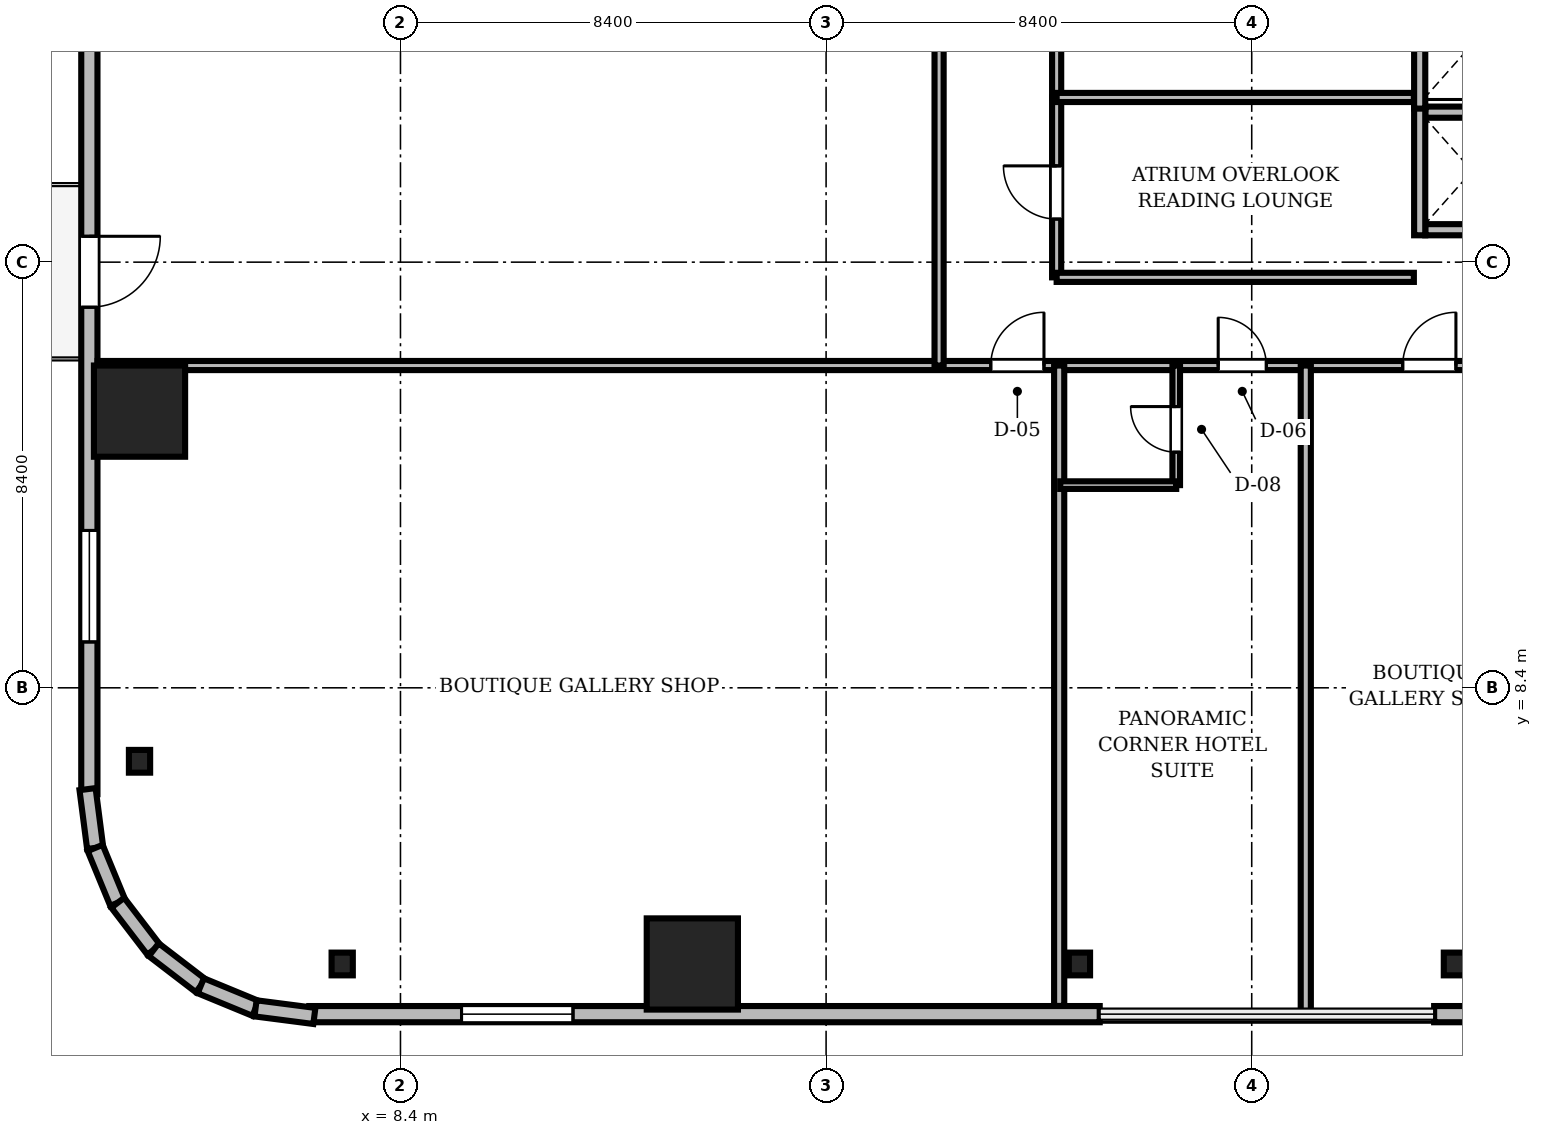
"""IFC4 building model, lengths in metres.
Left out: names, types, materials, properties, quantities, classifications, styles, units other than length and angle.
Written with IfcOpenShell. Run it as: python <this file> out.ifc"""

import sys

from ifc_helpers import new_model, si_unit, direction, frame, frame_2d, origin, origin_2d, place, context, subcontext, project, spatial, rectangle, i_section, extrude, source, transform, mapped, element, fill, save


model = new_model("IFC4")
c1 = context("Model", 3, precision=1e-05, world=origin(), true_north=direction((0.0, 1.0)))
c2 = subcontext(c1, "Body", "Model", "MODEL_VIEW")
j1 = project(units=[si_unit("LENGTHUNIT", "METRE"), si_unit("PLANEANGLEUNIT", "RADIAN")], contexts=[c1])
p1 = place(None, origin())
s1 = spatial("IfcSite", under=j1, at=p1, CompositionType="ELEMENT")
p2 = place(p1, origin())
s2 = spatial("IfcBuilding", under=s1, at=p2, CompositionType="ELEMENT")
p3 = place(p2, frame((0.0, 0.0, 45.85)))
s3 = spatial("IfcBuildingStorey", under=s2, at=p3, CompositionType="ELEMENT", Elevation=45.85)
m1 = source(origin(), c2, "Body", "SweptSolid", [
    extrude(rectangle(XDim=1.8, YDim=1.8, at=origin_2d()), origin(), (0.0, 0.0, 1.0), 3.41),
])
for number, where, z_axis, x_axis in (
    (1, (14.16, 2.95, 0.0), (0.0, 0.0, 1.0), (1.0, 0.0, 0.0)),
    (2, (3.25, 13.86, 0.0), (0.0, 0.0, 1.0), (1.0, 0.0, 0.0)),
):
    element("IfcColumn", number, at=place(p3, frame(where, z_axis=z_axis, x_axis=x_axis)), inside=s3, PredefinedType="COLUMN", context=c2, shape_type="MappedRepresentation", body=[
        mapped(m1, transform((0.0, 0.0, 0.0), scale=1.0)),
    ])
m2 = source(origin(), c2, "Body", "SweptSolid", [
    extrude(i_section(OverallWidth=0.419, OverallDepth=0.449, WebThickness=0.031, FlangeThickness=0.048, FilletRadius=0.015, at=origin_2d()), origin(), (0.0, 0.0, 1.0), 3.41),
])
for number, where, z_axis, x_axis in (
    (3, (7.25, 2.95, 0.0), (0.0, 0.0, 1.0), (1.0, 0.0, 0.0)),
    (4, (21.8, 2.95, 0.0), (0.0, 0.0, 1.0), (1.0, 0.0, 0.0)),
    (5, (29.2, 2.95, 0.0), (0.0, 0.0, 1.0), (1.0, 0.0, 0.0)),
    (6, (3.25, 6.95, 0.0), (0.0, 0.0, 1.0), (1.0, 0.0, 0.0)),
):
    element("IfcColumn", number, at=place(p3, frame(where, z_axis=z_axis, x_axis=x_axis)), inside=s3, PredefinedType="COLUMN", context=c2, shape_type="MappedRepresentation", body=[
        mapped(m2, transform((0.0, 0.0, 0.0), scale=1.0)),
    ])
m3 = source(origin(), c2, "Body", "SweptSolid", [
    extrude(rectangle(XDim=15.6, YDim=0.32, at=frame_2d((7.8, 0.0))), origin(), (0.0, 0.0, 1.0), 3.41),
])
p4 = place(p3, frame((6.6, 1.96, 0.0), z_axis=(0.0, 0.0, 1.0), x_axis=(1.0, 0.0, 0.0)))
e7 = element("IfcWall", 7, at=p4, inside=s3, PredefinedType="SOLIDWALL", context=c2, shape_type="MappedRepresentation", body=[
    mapped(m3, transform((0.0, 0.0, 0.0), scale=1.0)),
])
m4 = source(origin(), c2, "Body", "SweptSolid", [
    extrude(rectangle(XDim=2.2, YDim=2.4, at=frame_2d((1.1, 1.2))), frame((0.0, 0.17, 0.0), z_axis=(0.0, -1.0, 0.0), x_axis=(1.0, 0.0, 0.0)), (0.0, 0.0, 1.0), 0.34),
])
p5 = place(p4, frame((3.005, 0.0, 0.72)))
e8 = element("IfcOpeningElement", 8, at=p5, cuts=e7, PredefinedType="OPENING", context=c2, shape_type="MappedRepresentation", body=[
    mapped(m4, transform((0.0, 0.0, 0.0), scale=1.0)),
])
p6 = place(p3, frame((28.8, 1.96, 0.0), z_axis=(0.0, 0.0, 1.0), x_axis=(1.0, 0.0, 0.0)))
e9 = element("IfcWall", 9, at=p6, inside=s3, PredefinedType="SOLIDWALL", context=c2, shape_type="MappedRepresentation", body=[
    mapped(m3, transform((0.0, 0.0, 0.0), scale=1.0)),
])
m5 = source(origin(), c2, "Body", "SweptSolid", [
    extrude(rectangle(XDim=1.4, YDim=2.3, at=frame_2d((0.7, 1.15))), frame((0.0, 0.17, 0.0), z_axis=(0.0, -1.0, 0.0), x_axis=(1.0, 0.0, 0.0)), (0.0, 0.0, 1.0), 0.34),
])
p7 = place(p6, frame((4.59, 0.0, 0.0)))
e10 = element("IfcOpeningElement", 10, at=p7, cuts=e9, PredefinedType="OPENING", context=c2, shape_type="MappedRepresentation", body=[
    mapped(m5, transform((0.0, 0.0, 0.0), scale=1.0)),
])
p8 = place(p6, frame((9.495, 0.0, 0.72)))
e11 = element("IfcOpeningElement", 11, at=p8, cuts=e9, PredefinedType="OPENING", context=c2, shape_type="MappedRepresentation", body=[
    mapped(m4, transform((0.0, 0.0, 0.0), scale=1.0)),
])
p9 = place(p3, frame((2.26, 21.9, 0.0), z_axis=(0.0, 0.0, 1.0), x_axis=(0.0, -1.0, 0.0)))
e12 = element("IfcWall", 12, at=p9, inside=s3, PredefinedType="SOLIDWALL", context=c2, shape_type="MappedRepresentation", body=[
    mapped(m3, transform((0.0, 0.0, 0.0), scale=1.0)),
])
p10 = place(p9, frame((4.59, 0.0, 0.0)))
e13 = element("IfcOpeningElement", 13, at=p10, cuts=e12, PredefinedType="OPENING", context=c2, shape_type="MappedRepresentation", body=[
    mapped(m5, transform((0.0, 0.0, 0.0), scale=1.0)),
])
p11 = place(p9, frame((10.395, 0.0, 0.72)))
e14 = element("IfcOpeningElement", 14, at=p11, cuts=e12, PredefinedType="OPENING", context=c2, shape_type="MappedRepresentation", body=[
    mapped(m4, transform((0.0, 0.0, 0.0), scale=1.0)),
])
m6 = source(origin(), c2, "Body", "SweptSolid", [
    extrude(rectangle(XDim=1.171, YDim=0.32, at=frame_2d((0.585, 0.0))), origin(), (0.0, 0.0, 1.0), 3.41),
])
p12 = place(p3, frame((2.224, 6.401, 0.0), z_axis=(0.0, 0.0, 1.0), x_axis=(0.128269133229, -0.991739395941, 0.0)))
e15 = element("IfcWall", 15, at=p12, inside=s3, PredefinedType="SOLIDWALL", context=c2, shape_type="MappedRepresentation", body=[
    mapped(m6, transform((0.0, 0.0, 0.0), scale=1.0)),
])
m7 = source(origin(), c2, "Body", "SweptSolid", [
    extrude(rectangle(XDim=1.169, YDim=0.32, at=frame_2d((0.584, 0.0))), origin(), (0.0, 0.0, 1.0), 3.41),
])
for number, where, z_axis, x_axis in (
    (16, (2.375, 5.24, 0.0), (0.0, 0.0, 1.0), (0.381, -0.925, 0.0)),
    (17, (2.82, 4.159, 0.0), (0.0, 0.0, 1.0), (0.608, -0.794, 0.0)),
):
    element("IfcWall", number, at=place(p3, frame(where, z_axis=z_axis, x_axis=x_axis)), inside=s3, PredefinedType="SOLIDWALL", context=c2, shape_type="MappedRepresentation", body=[
        mapped(m7, transform((0.0, 0.0, 0.0), scale=1.0)),
    ])
m8 = source(origin(), c2, "Body", "SweptSolid", [
    extrude(rectangle(XDim=1.169, YDim=0.32, at=frame_2d((0.584, 0.0))), origin(), (0.0, 0.0, 1.0), 3.41),
])
p13 = place(p3, frame((3.531, 3.231, 0.0), z_axis=(0.0, 0.0, 1.0), x_axis=(0.793663520347, -0.608356981114, 0.0)))
e18 = element("IfcWall", 18, at=p13, inside=s3, PredefinedType="SOLIDWALL", context=c2, shape_type="MappedRepresentation", body=[
    mapped(m8, transform((0.0, 0.0, 0.0), scale=1.0)),
])
m9 = source(origin(), c2, "Body", "SweptSolid", [
    extrude(rectangle(XDim=1.169, YDim=0.32, at=frame_2d((0.585, 0.0))), origin(), (0.0, 0.0, 1.0), 3.41),
])
p14 = place(p3, frame((4.459, 2.52, 0.0), z_axis=(0.0, 0.0, 1.0), x_axis=(0.924479075121, -0.381232789334, 0.0)))
e19 = element("IfcWall", 19, at=p14, inside=s3, PredefinedType="SOLIDWALL", context=c2, shape_type="MappedRepresentation", body=[
    mapped(m9, transform((0.0, 0.0, 0.0), scale=1.0)),
])
m10 = source(origin(), c2, "Body", "SweptSolid", [
    extrude(rectangle(XDim=1.17, YDim=0.32, at=frame_2d((0.585, 0.0))), origin(), (0.0, 0.0, 1.0), 3.41),
])
p15 = place(p3, frame((5.54, 2.074, 0.0), z_axis=(0.0, 0.0, 1.0), x_axis=(0.991762485493, -0.128090485085, 0.0)))
e20 = element("IfcWall", 20, at=p15, inside=s3, PredefinedType="SOLIDWALL", context=c2, shape_type="MappedRepresentation", body=[
    mapped(m10, transform((0.0, 0.0, 0.0), scale=1.0)),
])
m11 = source(origin(), c2, "Body", "SweptSolid", [
    extrude(rectangle(XDim=1.85, YDim=0.22, at=frame_2d((0.925, 0.0))), origin(), (0.0, 0.0, 1.0), 3.41),
])
for number, where, z_axis, x_axis in (
    (21, (28.625, 17.44, 0.0), (0.0, 0.0, 1.0), (1.0, 0.0, 0.0)),
    (22, (28.625, 19.76, 0.0), (0.0, 0.0, 1.0), (1.0, 0.0, 0.0)),
):
    element("IfcWall", number, at=place(p3, frame(where, z_axis=z_axis, x_axis=x_axis)), inside=s3, PredefinedType="SOLIDWALL", context=c2, shape_type="MappedRepresentation", body=[
        mapped(m11, transform((0.0, 0.0, 0.0), scale=1.0)),
    ])
m12 = source(origin(), c2, "Body", "SweptSolid", [
    extrude(rectangle(XDim=2.54, YDim=0.22, at=frame_2d((1.27, 0.0))), origin(), (0.0, 0.0, 1.0), 3.41),
])
for number, where, z_axis, x_axis in (
    (23, (28.515, 17.33, 0.0), (0.0, 0.0, 1.0), (0.0, 1.0, 0.0)),
    (24, (28.515, 19.83, 0.0), (0.0, 0.0, 1.0), (0.0, 1.0, 0.0)),
):
    element("IfcWall", number, at=place(p3, frame(where, z_axis=z_axis, x_axis=x_axis)), inside=s3, PredefinedType="SOLIDWALL", context=c2, shape_type="MappedRepresentation", body=[
        mapped(m12, transform((0.0, 0.0, 0.0), scale=1.0)),
    ])
m13 = source(origin(), c2, "Body", "SweptSolid", [
    extrude(rectangle(XDim=46.156, YDim=0.18, at=frame_2d((23.078, 0.0))), origin(), (0.0, 0.0, 1.0), 2.652),
])
p16 = place(p3, frame((2.422, 14.76, 0.0), z_axis=(0.0, 0.0, 1.0), x_axis=(1.0, 0.0, 0.0)))
e25 = element("IfcWall", 25, at=p16, inside=s3, PredefinedType="PARTITIONING", context=c2, shape_type="MappedRepresentation", body=[
    mapped(m13, transform((0.0, 0.0, 0.0), scale=1.0)),
])
m14 = source(origin(), c2, "Body", "SweptSolid", [
    extrude(rectangle(XDim=1.05, YDim=2.2, at=frame_2d((0.525, 1.1))), frame((0.0, 0.1, 0.0), z_axis=(0.0, -1.0, 0.0), x_axis=(1.0, 0.0, 0.0)), (0.0, 0.0, 1.0), 0.2),
])
p17 = place(p16, frame((17.628, 0.0, 0.0)))
e26 = element("IfcOpeningElement", 26, at=p17, cuts=e25, PredefinedType="OPENING", context=c2, shape_type="MappedRepresentation", body=[
    mapped(m14, transform((0.0, 0.0, 0.0), scale=1.0)),
])
m15 = source(origin(), c2, "Body", "SweptSolid", [
    extrude(rectangle(XDim=0.95, YDim=2.15, at=frame_2d((0.475, 1.075))), frame((0.0, 0.1, 0.0), z_axis=(0.0, -1.0, 0.0), x_axis=(1.0, 0.0, 0.0)), (0.0, 0.0, 1.0), 0.2),
])
p18 = place(p16, frame((22.116, 0.0, 0.0)))
e27 = element("IfcOpeningElement", 27, at=p18, cuts=e25, PredefinedType="OPENING", context=c2, shape_type="MappedRepresentation", body=[
    mapped(m15, transform((0.0, 0.0, 0.0), scale=1.0)),
])
p19 = place(p16, frame((25.758, 0.0, 0.0)))
e28 = element("IfcOpeningElement", 28, at=p19, cuts=e25, PredefinedType="OPENING", context=c2, shape_type="MappedRepresentation", body=[
    mapped(m14, transform((0.0, 0.0, 0.0), scale=1.0)),
])
p20 = place(p16, frame((30.625, 0.0, 0.0)))
e29 = element("IfcOpeningElement", 29, at=p20, cuts=e25, PredefinedType="OPENING", context=c2, shape_type="MappedRepresentation", body=[
    mapped(m14, transform((0.0, 0.0, 0.0), scale=1.0)),
])
p21 = place(p16, frame((36.716, 0.0, 0.0)))
e30 = element("IfcOpeningElement", 30, at=p21, cuts=e25, PredefinedType="OPENING", context=c2, shape_type="MappedRepresentation", body=[
    mapped(m15, transform((0.0, 0.0, 0.0), scale=1.0)),
])
p22 = place(p16, frame((41.766, 0.0, 0.0)))
e31 = element("IfcOpeningElement", 31, at=p22, cuts=e25, PredefinedType="OPENING", context=c2, shape_type="MappedRepresentation", body=[
    mapped(m14, transform((0.0, 0.0, 0.0), scale=1.0)),
])
m16 = source(origin(), c2, "Body", "SweptSolid", [
    extrude(rectangle(XDim=4.15, YDim=0.18, at=frame_2d((2.075, 0.0))), origin(), (0.0, 0.0, 1.0), 3.042),
])
p23 = place(p3, frame((21.35, 20.05, 0.0), z_axis=(0.0, 0.0, 1.0), x_axis=(0.0, 1.0, 0.0)))
e32 = element("IfcWall", 32, at=p23, inside=s3, PredefinedType="PARTITIONING", context=c2, shape_type="MappedRepresentation", body=[
    mapped(m16, transform((0.0, 0.0, 0.0), scale=1.0)),
])
p24 = place(p23, frame((1.4, 0.0, 0.0)))
e33 = element("IfcOpeningElement", 33, at=p24, cuts=e32, PredefinedType="OPENING", context=c2, shape_type="MappedRepresentation", body=[
    mapped(m14, transform((0.0, 0.0, 0.0), scale=1.0)),
])
m17 = source(origin(), c2, "Body", "SweptSolid", [
    extrude(rectangle(XDim=3.55, YDim=0.18, at=frame_2d((1.775, 0.0))), origin(), (0.0, 0.0, 1.0), 2.802),
])
p25 = place(p3, frame((21.35, 16.5, 0.0), z_axis=(0.0, 0.0, 1.0), x_axis=(0.0, 1.0, 0.0)))
e34 = element("IfcWall", 34, at=p25, inside=s3, PredefinedType="PARTITIONING", context=c2, shape_type="MappedRepresentation", body=[
    mapped(m17, transform((0.0, 0.0, 0.0), scale=1.0)),
])
p26 = place(p25, frame((1.15, 0.0, 0.0)))
e35 = element("IfcOpeningElement", 35, at=p26, cuts=e34, PredefinedType="OPENING", context=c2, shape_type="MappedRepresentation", body=[
    mapped(m14, transform((0.0, 0.0, 0.0), scale=1.0)),
])
m18 = source(origin(), c2, "Body", "SweptSolid", [
    extrude(rectangle(XDim=2.36, YDim=0.15, at=frame_2d((1.18, 0.0))), origin(), (0.0, 0.0, 1.0), 3.41),
])
p27 = place(p3, frame((23.71, 12.4, 0.0), z_axis=(0.0, 0.0, 1.0), x_axis=(0.0, 1.0, 0.0)))
e36 = element("IfcWall", 36, at=p27, inside=s3, PredefinedType="PARTITIONING", context=c2, shape_type="MappedRepresentation", body=[
    mapped(m18, transform((0.0, 0.0, 0.0), scale=1.0)),
])
m19 = source(origin(), c2, "Body", "SweptSolid", [
    extrude(rectangle(XDim=0.9, YDim=2.1, at=frame_2d((0.45, 1.05))), frame((0.0, 0.085, 0.0), z_axis=(0.0, -1.0, 0.0), x_axis=(1.0, 0.0, 0.0)), (0.0, 0.0, 1.0), 0.17),
])
p28 = place(p27, frame((0.65, 0.0, 0.0)))
e37 = element("IfcOpeningElement", 37, at=p28, cuts=e36, PredefinedType="OPENING", context=c2, shape_type="MappedRepresentation", body=[
    mapped(m19, transform((0.0, 0.0, 0.0), scale=1.0)),
])
m20 = source(origin(), c2, "Body", "SweptSolid", [
    extrude(rectangle(XDim=13.79, YDim=0.18, at=frame_2d((6.895, 0.0))), origin(), (0.0, 0.0, 1.0), 2.802),
])
p29 = place(p3, frame((19.03, 14.76, 0.0), z_axis=(0.0, 0.0, 1.0), x_axis=(0.0, 1.0, 0.0)))
e38 = element("IfcWall", 38, at=p29, inside=s3, PredefinedType="PARTITIONING", context=c2, shape_type="MappedRepresentation", body=[
    mapped(m20, transform((0.0, 0.0, 0.0), scale=1.0)),
])
m21 = source(origin(), c2, "Body", "SweptSolid", [
    extrude(rectangle(XDim=12.638, YDim=0.2, at=frame_2d((6.319, 0.0))), origin(), (0.0, 0.0, 1.0), 2.652),
])
p30 = place(p3, frame((21.4, 2.122, 0.0), z_axis=(0.0, 0.0, 1.0), x_axis=(0.0, 1.0, 0.0)))
e39 = element("IfcWall", 39, at=p30, inside=s3, PredefinedType="PARTITIONING", context=c2, shape_type="MappedRepresentation", body=[
    mapped(m21, transform((0.0, 0.0, 0.0), scale=1.0)),
])
m22 = source(origin(), c2, "Body", "SweptSolid", [
    extrude(rectangle(XDim=12.83, YDim=0.2, at=frame_2d((6.415, 0.0))), origin(), (0.0, 0.0, 1.0), 2.652),
])
p31 = place(p3, frame((26.267, 1.93, 0.0), z_axis=(0.0, 0.0, 1.0), x_axis=(0.0, 1.0, 0.0)))
e40 = element("IfcWall", 40, at=p31, inside=s3, PredefinedType="PARTITIONING", context=c2, shape_type="MappedRepresentation", body=[
    mapped(m22, transform((0.0, 0.0, 0.0), scale=1.0)),
])
m23 = source(origin(), c2, "Body", "SweptSolid", [
    extrude(rectangle(XDim=7.05, YDim=0.18, at=frame_2d((3.525, 0.0))), origin(), (0.0, 0.0, 1.0), 2.802),
])
p32 = place(p3, frame((21.35, 16.5, 0.0), z_axis=(0.0, 0.0, 1.0), x_axis=(1.0, 0.0, 0.0)))
e41 = element("IfcWall", 41, at=p32, inside=s3, PredefinedType="PARTITIONING", context=c2, shape_type="MappedRepresentation", body=[
    mapped(m23, transform((0.0, 0.0, 0.0), scale=1.0)),
])
m24 = source(origin(), c2, "Body", "SweptSolid", [
    extrude(rectangle(XDim=7.05, YDim=0.18, at=frame_2d((3.525, 0.0))), origin(), (0.0, 0.0, 1.0), 3.41),
])
p33 = place(p3, frame((21.35, 20.05, 0.0), z_axis=(0.0, 0.0, 1.0), x_axis=(1.0, 0.0, 0.0)))
e42 = element("IfcWall", 42, at=p33, inside=s3, PredefinedType="PARTITIONING", context=c2, shape_type="MappedRepresentation", body=[
    mapped(m24, transform((0.0, 0.0, 0.0), scale=1.0)),
])
m25 = source(origin(), c2, "Body", "SweptSolid", [
    extrude(rectangle(XDim=2.29, YDim=0.15, at=frame_2d((1.145, 0.0))), origin(), (0.0, 0.0, 1.0), 3.41),
])
p34 = place(p3, frame((21.42, 12.4, 0.0), z_axis=(0.0, 0.0, 1.0), x_axis=(1.0, 0.0, 0.0)))
e43 = element("IfcWall", 43, at=p34, inside=s3, PredefinedType="PARTITIONING", context=c2, shape_type="MappedRepresentation", body=[
    mapped(m25, transform((0.0, 0.0, 0.0), scale=1.0)),
])
m26 = source(origin(), c2, "Body", "SweptSolid", [
    extrude(rectangle(XDim=2.2, YDim=2.4, at=frame_2d((1.1, 1.2))), frame((0.0, 0.03, 0.0), z_axis=(0.0, -1.0, 0.0), x_axis=(1.0, 0.0, 0.0)), (0.0, 0.0, 1.0), 0.06),
])
p35 = place(p5, origin())
e44 = element("IfcWindow", 44, at=p35, inside=s3, PartitioningType="SINGLE_PANEL", PredefinedType="WINDOW", context=c2, shape_type="MappedRepresentation", body=[
    mapped(m26, transform((0.0, 0.0, 0.0), scale=1.0)),
])
fill(e8, e44)
m27 = source(origin(), c2, "Body", "SweptSolid", [
    extrude(rectangle(XDim=1.4, YDim=2.3, at=frame_2d((0.7, 1.15))), frame((0.0, 0.025, 0.0), z_axis=(0.0, -1.0, 0.0), x_axis=(1.0, 0.0, 0.0)), (0.0, 0.0, 1.0), 0.05),
])
p36 = place(p10, frame((1.4, 0.0, 0.0), z_axis=(0.0, 0.0, 1.0), x_axis=(-1.0, 0.0, 0.0)))
e45 = element("IfcDoor", 45, at=p36, inside=s3, OperationType="DOUBLE_DOOR_SLIDING", PredefinedType="DOOR", context=c2, shape_type="MappedRepresentation", body=[
    mapped(m27, transform((0.0, 0.0, 0.0), scale=1.0)),
])
fill(e13, e45)
p37 = place(p11, origin())
e46 = element("IfcWindow", 46, at=p37, inside=s3, PartitioningType="SINGLE_PANEL", PredefinedType="WINDOW", context=c2, shape_type="MappedRepresentation", body=[
    mapped(m26, transform((0.0, 0.0, 0.0), scale=1.0)),
])
fill(e14, e46)
m28 = source(origin(), c2, "Body", "SweptSolid", [
    extrude(rectangle(XDim=1.05, YDim=2.2, at=frame_2d((0.525, 1.1))), frame((0.0, 0.025, 0.0), z_axis=(0.0, -1.0, 0.0), x_axis=(1.0, 0.0, 0.0)), (0.0, 0.0, 1.0), 0.05),
])
p38 = place(p17, origin())
e47 = element("IfcDoor", 47, at=p38, inside=s3, OperationType="SINGLE_SWING_RIGHT", PredefinedType="DOOR", context=c2, shape_type="MappedRepresentation", body=[
    mapped(m28, transform((0.0, 0.0, 0.0), scale=1.0)),
])
fill(e26, e47)
m29 = source(origin(), c2, "Body", "SweptSolid", [
    extrude(rectangle(XDim=0.95, YDim=2.15, at=frame_2d((0.475, 1.075))), frame((0.0, 0.025, 0.0), z_axis=(0.0, -1.0, 0.0), x_axis=(1.0, 0.0, 0.0)), (0.0, 0.0, 1.0), 0.05),
])
p39 = place(p18, origin())
e48 = element("IfcDoor", 48, at=p39, inside=s3, OperationType="SINGLE_SWING_LEFT", PredefinedType="DOOR", context=c2, shape_type="MappedRepresentation", body=[
    mapped(m29, transform((0.0, 0.0, 0.0), scale=1.0)),
])
fill(e27, e48)
p40 = place(p19, origin())
e49 = element("IfcDoor", 49, at=p40, inside=s3, OperationType="SINGLE_SWING_RIGHT", PredefinedType="DOOR", context=c2, shape_type="MappedRepresentation", body=[
    mapped(m28, transform((0.0, 0.0, 0.0), scale=1.0)),
])
fill(e28, e49)
p41 = place(p26, origin())
e50 = element("IfcDoor", 50, at=p41, inside=s3, OperationType="SINGLE_SWING_RIGHT", PredefinedType="DOOR", context=c2, shape_type="MappedRepresentation", body=[
    mapped(m28, transform((0.0, 0.0, 0.0), scale=1.0)),
])
fill(e35, e50)
m30 = source(origin(), c2, "Body", "SweptSolid", [
    extrude(rectangle(XDim=0.9, YDim=2.1, at=frame_2d((0.45, 1.05))), frame((0.0, 0.025, 0.0), z_axis=(0.0, -1.0, 0.0), x_axis=(1.0, 0.0, 0.0)), (0.0, 0.0, 1.0), 0.05),
])
p42 = place(p28, origin())
e51 = element("IfcDoor", 51, at=p42, inside=s3, OperationType="SINGLE_SWING_RIGHT", PredefinedType="DOOR", context=c2, shape_type="MappedRepresentation", body=[
    mapped(m30, transform((0.0, 0.0, 0.0), scale=1.0)),
])
fill(e37, e51)
save(model, sys.argv[1])
